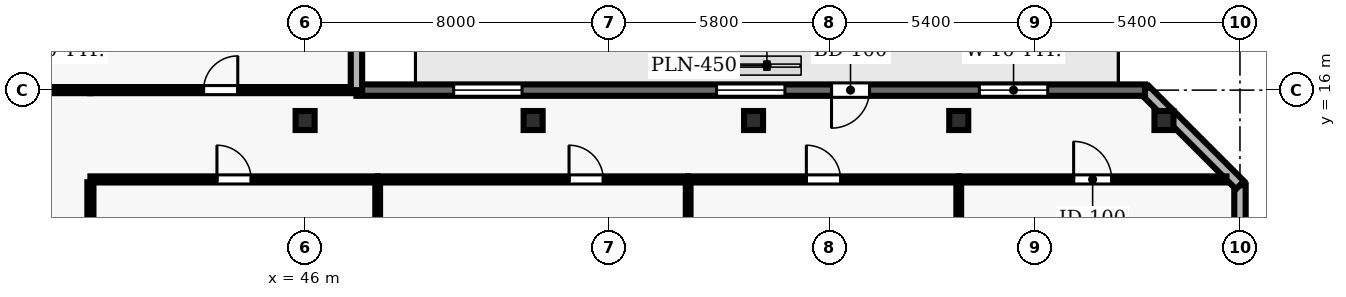
"""IFC4 building model, lengths in metres.
Left out: names, types, materials, properties, quantities, classifications, styles, units other than length and angle.
Written with IfcOpenShell. Run it as: python <this file> out.ifc"""

import sys

from ifc_helpers import new_model, si_unit, direction, frame, frame_2d, origin, origin_2d, place, context, subcontext, project, spatial, rectangle, hollow_rectangle, extrude, element, fill, save


model = new_model("IFC4")
c1 = context("Model", 3, precision=1e-05, world=origin(), true_north=direction((0.0, 1.0)))
c2 = subcontext(c1, "Body", "Model", "MODEL_VIEW")
j1 = project(units=[si_unit("LENGTHUNIT", "METRE"), si_unit("PLANEANGLEUNIT", "RADIAN")], contexts=[c1])
p1 = place(None, origin())
s1 = spatial("IfcSite", under=j1, at=p1, CompositionType="ELEMENT")
p2 = place(p1, origin())
s2 = spatial("IfcBuilding", under=s1, at=p2, CompositionType="ELEMENT")
p3 = place(p2, frame((0.0, 0.0, 122.9)))
s3 = spatial("IfcBuildingStorey", under=s2, at=p3, CompositionType="ELEMENT", Elevation=122.9)
for number, where, z_axis, x_axis in (
    (1, (46.0, 15.2, 0.0), (0.0, 0.0, 1.0), (1.0, 0.0, 0.0)),
    (2, (52.0, 15.2, 0.0), (0.0, 0.0, 1.0), (1.0, 0.0, 0.0)),
    (3, (57.8, 15.2, 0.0), (0.0, 0.0, 1.0), (1.0, 0.0, 0.0)),
    (4, (63.2, 15.2, 0.0), (0.0, 0.0, 1.0), (1.0, 0.0, 0.0)),
    (5, (68.6, 15.2, 0.0), (0.0, 0.0, 1.0), (1.0, 0.0, 0.0)),
):
    element("IfcColumn", number, at=place(p3, frame(where, z_axis=z_axis, x_axis=x_axis)), inside=s3, PredefinedType="COLUMN", context=c2, shape_type="SweptSolid", body=[
        extrude(hollow_rectangle(XDim=0.5, YDim=0.5, WallThickness=0.025, at=origin_2d()), origin(), (0.0, 0.0, 1.0), 3.9),
    ])
p4 = place(p3, frame((70.6, 2.5, 0.0), z_axis=(0.0, 0.0, 1.0), x_axis=(0.0, 1.0, 0.0)))
e6 = element("IfcWall", 6, at=p4, inside=s3, PredefinedType="SOLIDWALL", context=c2, shape_type="SweptSolid", body=[
    extrude(rectangle(XDim=11.0, YDim=0.3, at=frame_2d((5.5, 0.0))), origin(), (0.0, 0.0, 1.0), 3.69),
])
p5 = place(p4, frame((1.55, 0.0, 0.9)))
e7 = element("IfcOpeningElement", 7, at=p5, cuts=e6, PredefinedType="OPENING", context=c2, shape_type="SweptSolid", body=[
    extrude(rectangle(XDim=2.4, YDim=1.8, at=frame_2d((1.2, 0.9))), frame((0.0, 0.16, 0.0), z_axis=(0.0, -1.0, 0.0), x_axis=(1.0, 0.0, 0.0)), (0.0, 0.0, 1.0), 0.32),
])
p6 = place(p4, frame((7.05, 0.0, 0.9)))
e8 = element("IfcOpeningElement", 8, at=p6, cuts=e6, PredefinedType="OPENING", context=c2, shape_type="SweptSolid", body=[
    extrude(rectangle(XDim=2.4, YDim=1.8, at=frame_2d((1.2, 0.9))), frame((0.0, 0.16, 0.0), z_axis=(0.0, -1.0, 0.0), x_axis=(1.0, 0.0, 0.0)), (0.0, 0.0, 1.0), 0.32),
])
p7 = place(p3, frame((70.6, 13.5, 0.0), z_axis=(0.0, 0.0, 1.0), x_axis=(-0.707106781187, 0.707106781187, 0.0)))
e9 = element("IfcWall", 9, at=p7, inside=s3, PredefinedType="SOLIDWALL", context=c2, shape_type="SweptSolid", body=[
    extrude(rectangle(XDim=3.536, YDim=0.3, at=frame_2d((1.768, 0.0))), origin(), (0.0, 0.0, 1.0), 3.69),
])
p8 = place(p3, frame((68.1, 16.0, 0.0), z_axis=(0.0, 0.0, 1.0), x_axis=(-1.0, 0.0, 0.0)))
e10 = element("IfcWall", 10, at=p8, inside=s3, PredefinedType="SOLIDWALL", context=c2, shape_type="SweptSolid", body=[
    extrude(rectangle(XDim=20.749, YDim=0.3, at=frame_2d((10.375, 0.0))), origin(), (0.0, 0.0, 1.0), 3.69),
])
p9 = place(p8, frame((7.248, 0.0, 0.0)))
e11 = element("IfcOpeningElement", 11, at=p9, cuts=e10, PredefinedType="OPENING", context=c2, shape_type="SweptSolid", body=[
    extrude(rectangle(XDim=1.0, YDim=2.2, at=frame_2d((0.5, 1.1))), frame((0.0, 0.16, 0.0), z_axis=(0.0, -1.0, 0.0), x_axis=(1.0, 0.0, 0.0)), (0.0, 0.0, 1.0), 0.32),
])
p10 = place(p8, frame((2.558, 0.0, 0.9)))
e12 = element("IfcOpeningElement", 12, at=p10, cuts=e10, PredefinedType="OPENING", context=c2, shape_type="SweptSolid", body=[
    extrude(rectangle(XDim=1.8, YDim=2.2, at=frame_2d((0.9, 1.1))), frame((0.0, 0.16, 0.0), z_axis=(0.0, -1.0, 0.0), x_axis=(1.0, 0.0, 0.0)), (0.0, 0.0, 1.0), 0.32),
])
p11 = place(p8, frame((9.474, 0.0, 0.9)))
e13 = element("IfcOpeningElement", 13, at=p11, cuts=e10, PredefinedType="OPENING", context=c2, shape_type="SweptSolid", body=[
    extrude(rectangle(XDim=1.8, YDim=2.2, at=frame_2d((0.9, 1.1))), frame((0.0, 0.16, 0.0), z_axis=(0.0, -1.0, 0.0), x_axis=(1.0, 0.0, 0.0)), (0.0, 0.0, 1.0), 0.32),
])
p12 = place(p8, frame((16.391, 0.0, 0.9)))
e14 = element("IfcOpeningElement", 14, at=p12, cuts=e10, PredefinedType="OPENING", context=c2, shape_type="SweptSolid", body=[
    extrude(rectangle(XDim=1.8, YDim=2.2, at=frame_2d((0.9, 1.1))), frame((0.0, 0.16, 0.0), z_axis=(0.0, -1.0, 0.0), x_axis=(1.0, 0.0, 0.0)), (0.0, 0.0, 1.0), 0.32),
])
p13 = place(p3, frame((47.351, 16.0, 0.0), z_axis=(0.0, 0.0, 1.0), x_axis=(0.0, 1.0, 0.0)))
e15 = element("IfcWall", 15, at=p13, inside=s3, PredefinedType="SOLIDWALL", context=c2, shape_type="SweptSolid", body=[
    extrude(rectangle(XDim=10.7, YDim=0.3, at=frame_2d((5.35, 0.0))), origin(), (0.0, 0.0, 1.0), 3.69),
])
p14 = place(p13, frame((4.15, 0.0, 0.9)))
e16 = element("IfcOpeningElement", 16, at=p14, cuts=e15, PredefinedType="OPENING", context=c2, shape_type="SweptSolid", body=[
    extrude(rectangle(XDim=2.4, YDim=2.2, at=frame_2d((1.2, 1.1))), frame((0.0, 0.16, 0.0), z_axis=(0.0, -1.0, 0.0), x_axis=(1.0, 0.0, 0.0)), (0.0, 0.0, 1.0), 0.32),
])
p15 = place(p3, frame((40.35, 13.65, 0.0), z_axis=(0.0, 0.0, 1.0), x_axis=(1.0, 0.0, 0.0)))
e17 = element("IfcWall", 17, at=p15, inside=s3, PredefinedType="PARTITIONING", context=c2, shape_type="SweptSolid", body=[
    extrude(rectangle(XDim=7.56, YDim=0.16, at=frame_2d((3.78, 0.0))), origin(), (0.0, 0.0, 1.0), 3.69),
])
p16 = place(p15, frame((3.33, 0.0, 0.0)))
e18 = element("IfcOpeningElement", 18, at=p16, cuts=e17, PredefinedType="OPENING", context=c2, shape_type="SweptSolid", body=[
    extrude(rectangle(XDim=0.9, YDim=2.1, at=frame_2d((0.45, 1.05))), frame((0.0, 0.09, 0.0), z_axis=(0.0, -1.0, 0.0), x_axis=(1.0, 0.0, 0.0)), (0.0, 0.0, 1.0), 0.18),
])
p17 = place(p3, frame((40.35, 16.0, 0.0), z_axis=(0.0, 0.0, 1.0), x_axis=(-1.0, 0.0, 0.0)))
e19 = element("IfcWall", 19, at=p17, inside=s3, PredefinedType="PARTITIONING", context=c2, shape_type="SweptSolid", body=[
    extrude(rectangle(XDim=2.3, YDim=0.16, at=frame_2d((1.15, 0.0))), origin(), (0.0, 0.0, 1.0), 3.69),
])
p18 = place(p3, frame((40.35, 16.0, 0.0), z_axis=(0.0, 0.0, 1.0), x_axis=(1.0, 0.0, 0.0)))
e20 = element("IfcWall", 20, at=p18, inside=s3, PredefinedType="PARTITIONING", context=c2, shape_type="SweptSolid", body=[
    extrude(rectangle(XDim=6.856, YDim=0.16, at=frame_2d((3.428, 0.0))), origin(), (0.0, 0.0, 1.0), 3.39),
])
p19 = place(p18, frame((2.978, 0.0, 0.0)))
e21 = element("IfcOpeningElement", 21, at=p19, cuts=e20, PredefinedType="OPENING", context=c2, shape_type="SweptSolid", body=[
    extrude(rectangle(XDim=0.9, YDim=2.1, at=frame_2d((0.45, 1.05))), frame((0.0, 0.09, 0.0), z_axis=(0.0, -1.0, 0.0), x_axis=(1.0, 0.0, 0.0)), (0.0, 0.0, 1.0), 0.18),
])
p20 = place(p3, frame((47.91, 13.65, 0.0), z_axis=(0.0, 0.0, 1.0), x_axis=(1.0, 0.0, 0.0)))
e22 = element("IfcWall", 22, at=p20, inside=s3, PredefinedType="PARTITIONING", context=c2, shape_type="SweptSolid", body=[
    extrude(rectangle(XDim=8.17, YDim=0.16, at=frame_2d((4.085, 0.0))), origin(), (0.0, 0.0, 1.0), 3.69),
])
p21 = place(p20, frame((5.035, 0.0, 0.0)))
e23 = element("IfcOpeningElement", 23, at=p21, cuts=e22, PredefinedType="OPENING", context=c2, shape_type="SweptSolid", body=[
    extrude(rectangle(XDim=0.9, YDim=2.1, at=frame_2d((0.45, 1.05))), frame((0.0, 0.09, 0.0), z_axis=(0.0, -1.0, 0.0), x_axis=(1.0, 0.0, 0.0)), (0.0, 0.0, 1.0), 0.18),
])
p22 = place(p3, frame((56.08, 13.65, 0.0), z_axis=(0.0, 0.0, 1.0), x_axis=(1.0, 0.0, 0.0)))
e24 = element("IfcWall", 24, at=p22, inside=s3, PredefinedType="PARTITIONING", context=c2, shape_type="SweptSolid", body=[
    extrude(rectangle(XDim=7.12, YDim=0.16, at=frame_2d((3.56, 0.0))), origin(), (0.0, 0.0, 1.0), 3.69),
])
p23 = place(p22, frame((3.11, 0.0, 0.0)))
e25 = element("IfcOpeningElement", 25, at=p23, cuts=e24, PredefinedType="OPENING", context=c2, shape_type="SweptSolid", body=[
    extrude(rectangle(XDim=0.9, YDim=2.1, at=frame_2d((0.45, 1.05))), frame((0.0, 0.09, 0.0), z_axis=(0.0, -1.0, 0.0), x_axis=(1.0, 0.0, 0.0)), (0.0, 0.0, 1.0), 0.18),
])
p24 = place(p3, frame((63.2, 13.65, 0.0), z_axis=(0.0, 0.0, 1.0), x_axis=(1.0, 0.0, 0.0)))
e26 = element("IfcWall", 26, at=p24, inside=s3, PredefinedType="PARTITIONING", context=c2, shape_type="SweptSolid", body=[
    extrude(rectangle(XDim=7.045, YDim=0.16, at=frame_2d((3.522, 0.0))), origin(), (0.0, 0.0, 1.0), 3.69),
])
p25 = place(p24, frame((3.023, 0.0, 0.0)))
e27 = element("IfcOpeningElement", 27, at=p25, cuts=e26, PredefinedType="OPENING", context=c2, shape_type="SweptSolid", body=[
    extrude(rectangle(XDim=1.0, YDim=2.1, at=frame_2d((0.5, 1.05))), frame((0.0, 0.09, 0.0), z_axis=(0.0, -1.0, 0.0), x_axis=(1.0, 0.0, 0.0)), (0.0, 0.0, 1.0), 0.18),
])
p26 = place(p3, frame((40.35, 8.008, 0.0), z_axis=(0.0, 0.0, 1.0), x_axis=(0.0, 1.0, 0.0)))
e28 = element("IfcWall", 28, at=p26, inside=s3, PredefinedType="PARTITIONING", context=c2, shape_type="SweptSolid", body=[
    extrude(rectangle(XDim=5.567, YDim=0.16, at=frame_2d((2.783, 0.0))), origin(), (0.0, 0.0, 1.0), 3.69),
])
for number, where, z_axis, x_axis in (
    (29, (47.91, 8.035, 0.0), (0.0, 0.0, 1.0), (0.0, 1.0, 0.0)),
    (30, (56.08, 8.035, 0.0), (0.0, 0.0, 1.0), (0.0, 1.0, 0.0)),
):
    element("IfcWall", number, at=place(p3, frame(where, z_axis=z_axis, x_axis=x_axis)), inside=s3, PredefinedType="PARTITIONING", context=c2, shape_type="SweptSolid", body=[
        extrude(rectangle(XDim=5.54, YDim=0.125, at=frame_2d((2.77, 0.0))), origin(), (0.0, 0.0, 1.0), 3.69),
    ])
p27 = place(p3, frame((63.2, 8.008, 0.0), z_axis=(0.0, 0.0, 1.0), x_axis=(0.0, 1.0, 0.0)))
e31 = element("IfcWall", 31, at=p27, inside=s3, PredefinedType="PARTITIONING", context=c2, shape_type="SweptSolid", body=[
    extrude(rectangle(XDim=5.567, YDim=0.125, at=frame_2d((2.783, 0.0))), origin(), (0.0, 0.0, 1.0), 3.073),
])
p28 = place(p9, origin())
e32 = element("IfcDoor", 32, at=p28, inside=s3, OperationType="SINGLE_SWING_RIGHT", PredefinedType="DOOR", context=c2, shape_type="SweptSolid", body=[
    extrude(rectangle(XDim=1.0, YDim=2.2, at=frame_2d((0.5, 1.1))), frame((0.0, 0.025, 0.0), z_axis=(0.0, -1.0, 0.0), x_axis=(1.0, 0.0, 0.0)), (0.0, 0.0, 1.0), 0.05),
])
fill(e11, e32)
p29 = place(p10, origin())
e33 = element("IfcWindow", 33, at=p29, inside=s3, PartitioningType="SINGLE_PANEL", PredefinedType="WINDOW", context=c2, shape_type="SweptSolid", body=[
    extrude(rectangle(XDim=1.8, YDim=2.2, at=frame_2d((0.9, 1.1))), frame((0.0, 0.03, 0.0), z_axis=(0.0, -1.0, 0.0), x_axis=(1.0, 0.0, 0.0)), (0.0, 0.0, 1.0), 0.06),
])
fill(e12, e33)
p30 = place(p11, origin())
e34 = element("IfcWindow", 34, at=p30, inside=s3, PartitioningType="SINGLE_PANEL", PredefinedType="WINDOW", context=c2, shape_type="SweptSolid", body=[
    extrude(rectangle(XDim=1.8, YDim=2.2, at=frame_2d((0.9, 1.1))), frame((0.0, 0.03, 0.0), z_axis=(0.0, -1.0, 0.0), x_axis=(1.0, 0.0, 0.0)), (0.0, 0.0, 1.0), 0.06),
])
fill(e13, e34)
p31 = place(p12, origin())
e35 = element("IfcWindow", 35, at=p31, inside=s3, PartitioningType="SINGLE_PANEL", PredefinedType="WINDOW", context=c2, shape_type="SweptSolid", body=[
    extrude(rectangle(XDim=1.8, YDim=2.2, at=frame_2d((0.9, 1.1))), frame((0.0, 0.03, 0.0), z_axis=(0.0, -1.0, 0.0), x_axis=(1.0, 0.0, 0.0)), (0.0, 0.0, 1.0), 0.06),
])
fill(e14, e35)
p32 = place(p16, origin())
e36 = element("IfcDoor", 36, at=p32, inside=s3, OperationType="SINGLE_SWING_LEFT", PredefinedType="DOOR", context=c2, shape_type="SweptSolid", body=[
    extrude(rectangle(XDim=0.9, YDim=2.1, at=frame_2d((0.45, 1.05))), frame((0.0, 0.025, 0.0), z_axis=(0.0, -1.0, 0.0), x_axis=(1.0, 0.0, 0.0)), (0.0, 0.0, 1.0), 0.05),
])
fill(e18, e36)
p33 = place(p21, origin())
e37 = element("IfcDoor", 37, at=p33, inside=s3, OperationType="SINGLE_SWING_LEFT", PredefinedType="DOOR", context=c2, shape_type="SweptSolid", body=[
    extrude(rectangle(XDim=0.9, YDim=2.1, at=frame_2d((0.45, 1.05))), frame((0.0, 0.025, 0.0), z_axis=(0.0, -1.0, 0.0), x_axis=(1.0, 0.0, 0.0)), (0.0, 0.0, 1.0), 0.05),
])
fill(e23, e37)
p34 = place(p23, origin())
e38 = element("IfcDoor", 38, at=p34, inside=s3, OperationType="SINGLE_SWING_LEFT", PredefinedType="DOOR", context=c2, shape_type="SweptSolid", body=[
    extrude(rectangle(XDim=0.9, YDim=2.1, at=frame_2d((0.45, 1.05))), frame((0.0, 0.025, 0.0), z_axis=(0.0, -1.0, 0.0), x_axis=(1.0, 0.0, 0.0)), (0.0, 0.0, 1.0), 0.05),
])
fill(e25, e38)
p35 = place(p25, origin())
e39 = element("IfcDoor", 39, at=p35, inside=s3, OperationType="SINGLE_SWING_LEFT", PredefinedType="DOOR", context=c2, shape_type="SweptSolid", body=[
    extrude(rectangle(XDim=1.0, YDim=2.1, at=frame_2d((0.5, 1.05))), frame((0.0, 0.025, 0.0), z_axis=(0.0, -1.0, 0.0), x_axis=(1.0, 0.0, 0.0)), (0.0, 0.0, 1.0), 0.05),
])
fill(e27, e39)
p36 = place(p19, origin())
e40 = element("IfcDoor", 40, at=p36, inside=s3, OperationType="SINGLE_SWING_RIGHT", PredefinedType="DOOR", context=c2, shape_type="SweptSolid", body=[
    extrude(rectangle(XDim=0.9, YDim=2.1, at=frame_2d((0.45, 1.05))), frame((0.0, 0.025, 0.0), z_axis=(0.0, -1.0, 0.0), x_axis=(1.0, 0.0, 0.0)), (0.0, 0.0, 1.0), 0.05),
])
fill(e21, e40)
save(model, sys.argv[1])
